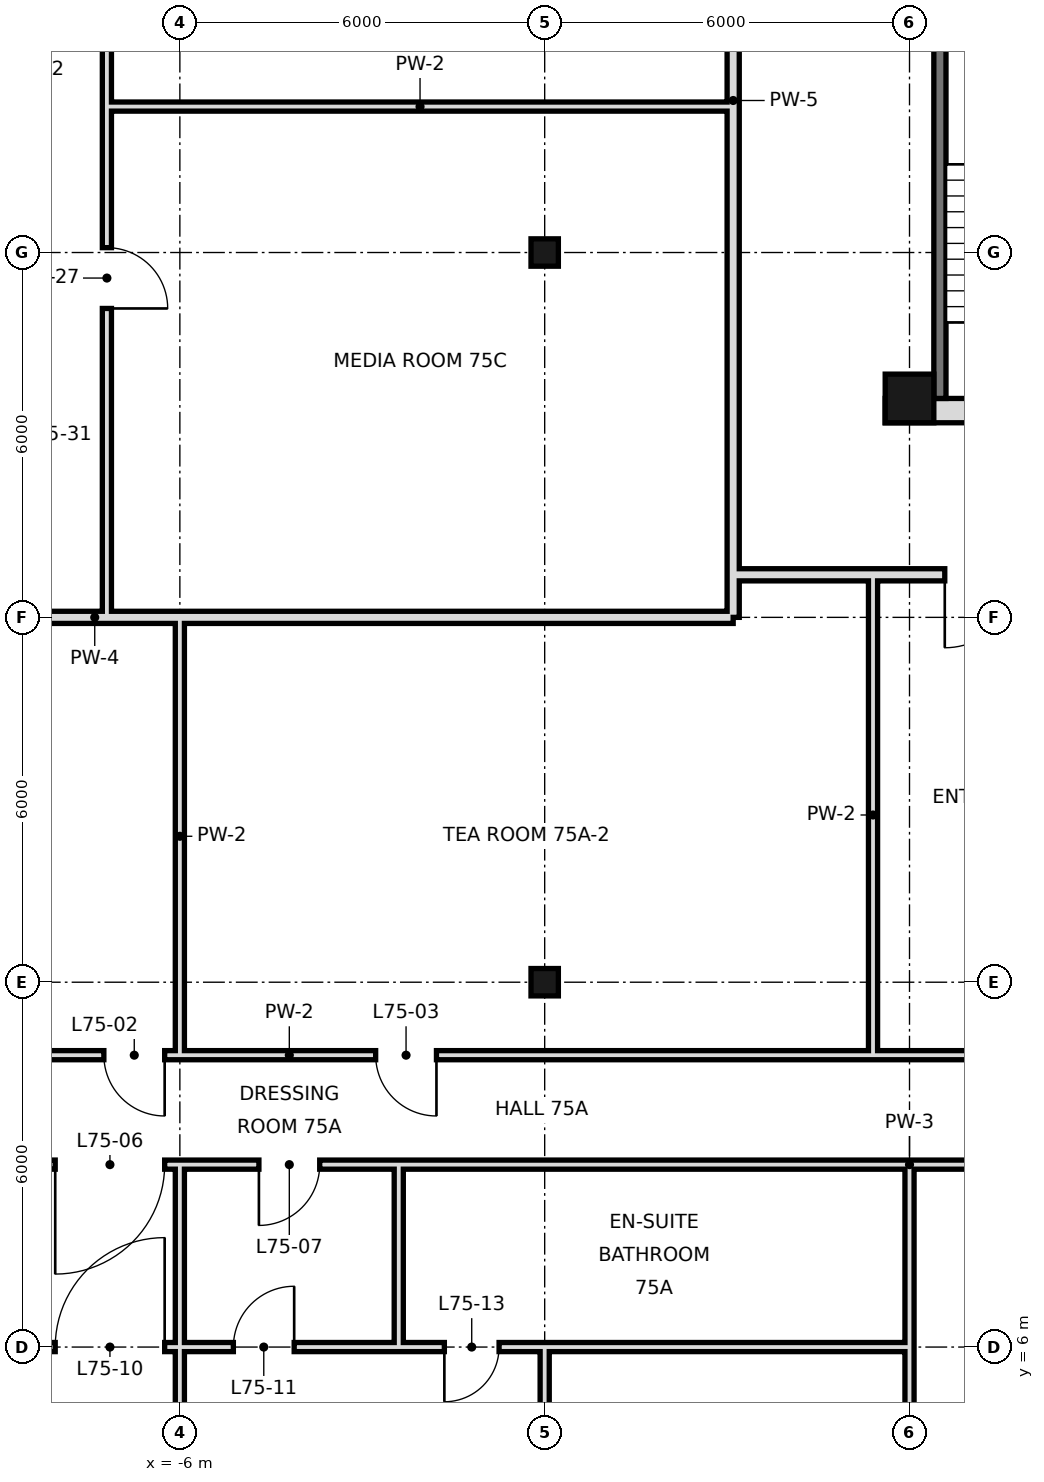
"""IFC4 building model, lengths in metres.
Left out: names, types, materials, properties, quantities, classifications, styles, units other than length and angle.
Written with IfcOpenShell. Run it as: python <this file> out.ifc"""

import sys

from ifc_helpers import new_model, si_unit, direction, frame, frame_2d, origin, origin_2d, place, context, subcontext, project, spatial, rectangle, hollow_rectangle, extrude, element, fill, save


model = new_model("IFC4")
c1 = context("Model", 3, precision=1e-05, world=origin(), true_north=direction((0.0, 1.0)))
c2 = subcontext(c1, "Body", "Model", "MODEL_VIEW")
j1 = project(units=[si_unit("LENGTHUNIT", "METRE"), si_unit("PLANEANGLEUNIT", "RADIAN")], contexts=[c1])
p1 = place(None, origin())
s1 = spatial("IfcSite", under=j1, at=p1, CompositionType="ELEMENT")
p2 = place(p1, origin())
s2 = spatial("IfcBuilding", under=s1, at=p2, CompositionType="ELEMENT")
p3 = place(p2, frame((0.0, 0.0, 316.0)))
s3 = spatial("IfcBuildingStorey", under=s2, at=p3, CompositionType="ELEMENT", Elevation=316.0)
for number, where, z_axis, x_axis in (
    (1, (0.0, 12.0, 0.0), (0.0, 0.0, 1.0), (1.0, 0.0, 0.0)),
    (2, (0.0, 24.0, 0.0), (0.0, 0.0, 1.0), (1.0, 0.0, 0.0)),
):
    element("IfcColumn", number, at=place(p3, frame(where, z_axis=z_axis, x_axis=x_axis)), inside=s3, PredefinedType="COLUMN", context=c2, shape_type="SweptSolid", body=[
        extrude(hollow_rectangle(XDim=0.45, YDim=0.45, WallThickness=0.022, at=origin_2d()), origin(), (0.0, 0.0, 1.0), 3.6),
    ])
p4 = place(p3, frame((6.0, 21.6, 0.0), z_axis=(0.0, 0.0, 1.0), x_axis=(1.0, 0.0, 0.0)))
e3 = element("IfcColumn", 3, at=p4, inside=s3, PredefinedType="COLUMN", context=c2, shape_type="SweptSolid", body=[
    extrude(hollow_rectangle(XDim=0.8, YDim=0.8, WallThickness=0.025, at=origin_2d()), origin(), (0.0, 0.0, 1.0), 3.6),
])
p5 = place(p3, frame((-2.4, 6.0, 0.0), z_axis=(0.0, 0.0, 1.0), x_axis=(0.0, 1.0, 0.0)))
e4 = element("IfcWall", 4, at=p5, inside=s3, PredefinedType="PARTITIONING", context=c2, shape_type="SweptSolid", body=[
    extrude(rectangle(XDim=3.0, YDim=0.15, at=frame_2d((1.5, 0.0))), origin(), (0.0, 0.0, 1.0), 3.42),
])
p6 = place(p3, frame((-6.0, -0.6, 0.0), z_axis=(0.0, 0.0, 1.0), x_axis=(0.0, 1.0, 0.0)))
e5 = element("IfcWall", 5, at=p6, inside=s3, PredefinedType="PARTITIONING", context=c2, shape_type="SweptSolid", body=[
    extrude(rectangle(XDim=9.6, YDim=0.15, at=frame_2d((4.8, 0.0))), origin(), (0.0, 0.0, 1.0), 3.42),
])
p7 = place(p3, frame((-6.0, 10.8, 0.0), z_axis=(0.0, 0.0, 1.0), x_axis=(0.0, 1.0, 0.0)))
e6 = element("IfcWall", 6, at=p7, inside=s3, PredefinedType="PARTITIONING", context=c2, shape_type="SweptSolid", body=[
    extrude(rectangle(XDim=7.2, YDim=0.15, at=frame_2d((3.6, 0.0))), origin(), (0.0, 0.0, 1.0), 3.42),
])
p8 = place(p3, frame((-7.2, 18.0, 0.0), z_axis=(0.0, 0.0, 1.0), x_axis=(0.0, 1.0, 0.0)))
e7 = element("IfcWall", 7, at=p8, inside=s3, PredefinedType="PARTITIONING", context=c2, shape_type="SweptSolid", body=[
    extrude(rectangle(XDim=23.4, YDim=0.15, at=frame_2d((11.7, 0.0))), origin(), (0.0, 0.0, 1.0), 3.42),
])
p9 = place(p8, frame((9.7, 0.0, 0.0)))
e8 = element("IfcOpeningElement", 8, at=p9, cuts=e7, PredefinedType="OPENING", context=c2, shape_type="SweptSolid", body=[
    extrude(rectangle(XDim=1.0, YDim=2.4, at=frame_2d((0.5, 1.2))), frame((0.0, 0.085, 0.0), z_axis=(0.0, -1.0, 0.0), x_axis=(1.0, 0.0, 0.0)), (0.0, 0.0, 1.0), 0.17),
])
p10 = place(p8, frame((5.08, 0.0, 0.0)))
e9 = element("IfcOpeningElement", 9, at=p10, cuts=e7, PredefinedType="OPENING", context=c2, shape_type="SweptSolid", body=[
    extrude(rectangle(XDim=1.0, YDim=2.4, at=frame_2d((0.5, 1.2))), frame((0.0, 0.085, 0.0), z_axis=(0.0, -1.0, 0.0), x_axis=(1.0, 0.0, 0.0)), (0.0, 0.0, 1.0), 0.17),
])
p11 = place(p8, frame((15.22, 0.0, 0.0)))
e10 = element("IfcOpeningElement", 10, at=p11, cuts=e7, PredefinedType="OPENING", context=c2, shape_type="SweptSolid", body=[
    extrude(rectangle(XDim=1.0, YDim=2.4, at=frame_2d((0.5, 1.2))), frame((0.0, 0.085, 0.0), z_axis=(0.0, -1.0, 0.0), x_axis=(1.0, 0.0, 0.0)), (0.0, 0.0, 1.0), 0.17),
])
p12 = place(p3, frame((0.0, 0.0, 0.0), z_axis=(0.0, 0.0, 1.0), x_axis=(0.0, 1.0, 0.0)))
e11 = element("IfcWall", 11, at=p12, inside=s3, PredefinedType="PARTITIONING", context=c2, shape_type="SweptSolid", body=[
    extrude(rectangle(XDim=6.0, YDim=0.15, at=frame_2d((3.0, 0.0))), origin(), (0.0, 0.0, 1.0), 2.72),
])
p13 = place(p12, frame((3.4, 0.0, 0.0)))
e12 = element("IfcOpeningElement", 12, at=p13, cuts=e11, PredefinedType="OPENING", context=c2, shape_type="SweptSolid", body=[
    extrude(rectangle(XDim=1.0, YDim=2.4, at=frame_2d((0.5, 1.2))), frame((0.0, 0.085, 0.0), z_axis=(0.0, -1.0, 0.0), x_axis=(1.0, 0.0, 0.0)), (0.0, 0.0, 1.0), 0.17),
])
p14 = place(p3, frame((3.1, 18.7, 0.0), z_axis=(0.0, 0.0, 1.0), x_axis=(0.0, 1.0, 0.0)))
e13 = element("IfcWall", 13, at=p14, inside=s3, PredefinedType="SOLIDWALL", context=c2, shape_type="SweptSolid", body=[
    extrude(rectangle(XDim=22.7, YDim=0.2, at=frame_2d((11.35, 0.0))), origin(), (0.0, 0.0, 1.0), 2.97),
])
p15 = place(p14, frame((8.9, 0.0, 0.0)))
e14 = element("IfcOpeningElement", 14, at=p15, cuts=e13, PredefinedType="OPENING", context=c2, shape_type="SweptSolid", body=[
    extrude(rectangle(XDim=1.2, YDim=2.4, at=frame_2d((0.6, 1.2))), frame((0.0, 0.11, 0.0), z_axis=(0.0, -1.0, 0.0), x_axis=(1.0, 0.0, 0.0)), (0.0, 0.0, 1.0), 0.22),
])
p16 = place(p3, frame((3.1, 18.0, 0.0), z_axis=(0.0, 0.0, 1.0), x_axis=(0.0, 1.0, 0.0)))
e15 = element("IfcWall", 15, at=p16, inside=s3, PredefinedType="SOLIDWALL", context=c2, shape_type="SweptSolid", body=[
    extrude(rectangle(XDim=0.7, YDim=0.2, at=frame_2d((0.35, 0.0))), origin(), (0.0, 0.0, 1.0), 2.97),
])
p17 = place(p3, frame((5.4, 10.8, 0.0), z_axis=(0.0, 0.0, 1.0), x_axis=(0.0, 1.0, 0.0)))
e16 = element("IfcWall", 16, at=p17, inside=s3, PredefinedType="PARTITIONING", context=c2, shape_type="SweptSolid", body=[
    extrude(rectangle(XDim=7.9, YDim=0.15, at=frame_2d((3.95, 0.0))), origin(), (0.0, 0.0, 1.0), 3.42),
])
p18 = place(p3, frame((6.0, -0.6, 0.0), z_axis=(0.0, 0.0, 1.0), x_axis=(0.0, 1.0, 0.0)))
e17 = element("IfcWall", 17, at=p18, inside=s3, PredefinedType="PARTITIONING", context=c2, shape_type="SweptSolid", body=[
    extrude(rectangle(XDim=6.6, YDim=0.15, at=frame_2d((3.3, 0.0))), origin(), (0.0, 0.0, 1.0), 3.42),
])
p19 = place(p3, frame((6.0, 6.0, 0.0), z_axis=(0.0, 0.0, 1.0), x_axis=(0.0, 1.0, 0.0)))
e18 = element("IfcWall", 18, at=p19, inside=s3, PredefinedType="PARTITIONING", context=c2, shape_type="SweptSolid", body=[
    extrude(rectangle(XDim=3.0, YDim=0.15, at=frame_2d((1.5, 0.0))), origin(), (0.0, 0.0, 1.0), 3.42),
])
p20 = place(p3, frame((-18.6, 10.8, 0.0), z_axis=(0.0, 0.0, 1.0), x_axis=(1.0, 0.0, 0.0)))
e19 = element("IfcWall", 19, at=p20, inside=s3, PredefinedType="PARTITIONING", context=c2, shape_type="SweptSolid", body=[
    extrude(rectangle(XDim=28.8, YDim=0.15, at=frame_2d((14.4, 0.0))), origin(), (0.0, 0.0, 1.0), 3.42),
])
p21 = place(p20, frame((25.9, 0.0, 0.0)))
e20 = element("IfcOpeningElement", 20, at=p21, cuts=e19, PredefinedType="OPENING", context=c2, shape_type="SweptSolid", body=[
    extrude(rectangle(XDim=1.0, YDim=2.4, at=frame_2d((0.5, 1.2))), frame((0.0, 0.085, 0.0), z_axis=(0.0, -1.0, 0.0), x_axis=(1.0, 0.0, 0.0)), (0.0, 0.0, 1.0), 0.17),
])
p22 = place(p20, frame((11.35, 0.0, 0.0)))
e21 = element("IfcOpeningElement", 21, at=p22, cuts=e19, PredefinedType="OPENING", context=c2, shape_type="SweptSolid", body=[
    extrude(rectangle(XDim=1.0, YDim=2.4, at=frame_2d((0.5, 1.2))), frame((0.0, 0.085, 0.0), z_axis=(0.0, -1.0, 0.0), x_axis=(1.0, 0.0, 0.0)), (0.0, 0.0, 1.0), 0.17),
])
p23 = place(p20, frame((15.82, 0.0, 0.0)))
e22 = element("IfcOpeningElement", 22, at=p23, cuts=e19, PredefinedType="OPENING", context=c2, shape_type="SweptSolid", body=[
    extrude(rectangle(XDim=1.0, YDim=2.4, at=frame_2d((0.5, 1.2))), frame((0.0, 0.085, 0.0), z_axis=(0.0, -1.0, 0.0), x_axis=(1.0, 0.0, 0.0)), (0.0, 0.0, 1.0), 0.17),
])
p24 = place(p3, frame((-18.6, 18.0, 0.0), z_axis=(0.0, 0.0, 1.0), x_axis=(1.0, 0.0, 0.0)))
e23 = element("IfcWall", 23, at=p24, inside=s3, PredefinedType="SOLIDWALL", context=c2, shape_type="SweptSolid", body=[
    extrude(rectangle(XDim=21.7, YDim=0.2, at=frame_2d((10.85, 0.0))), origin(), (0.0, 0.0, 1.0), 2.72),
])
p25 = place(p3, frame((3.1, 18.7, 0.0), z_axis=(0.0, 0.0, 1.0), x_axis=(1.0, 0.0, 0.0)))
e24 = element("IfcWall", 24, at=p25, inside=s3, PredefinedType="SOLIDWALL", context=c2, shape_type="SweptSolid", body=[
    extrude(rectangle(XDim=7.1, YDim=0.2, at=frame_2d((3.55, 0.0))), origin(), (0.0, 0.0, 1.0), 2.72),
])
p26 = place(p25, frame((3.48, 0.0, 0.0)))
e25 = element("IfcOpeningElement", 25, at=p26, cuts=e24, PredefinedType="OPENING", context=c2, shape_type="SweptSolid", body=[
    extrude(rectangle(XDim=1.2, YDim=2.4, at=frame_2d((0.6, 1.2))), frame((0.0, 0.11, 0.0), z_axis=(0.0, -1.0, 0.0), x_axis=(1.0, 0.0, 0.0)), (0.0, 0.0, 1.0), 0.22),
])
p27 = place(p3, frame((-7.2, 26.4, 0.0), z_axis=(0.0, 0.0, 1.0), x_axis=(1.0, 0.0, 0.0)))
e26 = element("IfcWall", 26, at=p27, inside=s3, PredefinedType="PARTITIONING", context=c2, shape_type="SweptSolid", body=[
    extrude(rectangle(XDim=10.3, YDim=0.15, at=frame_2d((5.15, 0.0))), origin(), (0.0, 0.0, 1.0), 3.42),
])
p28 = place(p3, frame((-18.0, 6.0, 0.0), z_axis=(0.0, 0.0, 1.0), x_axis=(1.0, 0.0, 0.0)))
e27 = element("IfcWall", 27, at=p28, inside=s3, PredefinedType="PARTITIONING", context=c2, shape_type="SweptSolid", body=[
    extrude(rectangle(XDim=15.6, YDim=0.15, at=frame_2d((7.8, 0.0))), origin(), (0.0, 0.0, 1.0), 2.72),
])
p29 = place(p28, frame((9.95, 0.0, 0.0)))
e28 = element("IfcOpeningElement", 28, at=p29, cuts=e27, PredefinedType="OPENING", context=c2, shape_type="SweptSolid", body=[
    extrude(rectangle(XDim=1.8, YDim=2.4, at=frame_2d((0.9, 1.2))), frame((0.0, 0.085, 0.0), z_axis=(0.0, -1.0, 0.0), x_axis=(1.0, 0.0, 0.0)), (0.0, 0.0, 1.0), 0.17),
])
p30 = place(p28, frame((12.88, 0.0, 0.0)))
e29 = element("IfcOpeningElement", 29, at=p30, cuts=e27, PredefinedType="OPENING", context=c2, shape_type="SweptSolid", body=[
    extrude(rectangle(XDim=1.0, YDim=2.4, at=frame_2d((0.5, 1.2))), frame((0.0, 0.085, 0.0), z_axis=(0.0, -1.0, 0.0), x_axis=(1.0, 0.0, 0.0)), (0.0, 0.0, 1.0), 0.17),
])
p31 = place(p3, frame((-2.4, 6.0, 0.0), z_axis=(0.0, 0.0, 1.0), x_axis=(1.0, 0.0, 0.0)))
e30 = element("IfcWall", 30, at=p31, inside=s3, PredefinedType="PARTITIONING", context=c2, shape_type="SweptSolid", body=[
    extrude(rectangle(XDim=8.4, YDim=0.15, at=frame_2d((4.2, 0.0))), origin(), (0.0, 0.0, 1.0), 2.72),
])
p32 = place(p31, frame((0.75, 0.0, 0.0)))
e31 = element("IfcOpeningElement", 31, at=p32, cuts=e30, PredefinedType="OPENING", context=c2, shape_type="SweptSolid", body=[
    extrude(rectangle(XDim=0.9, YDim=2.4, at=frame_2d((0.45, 1.2))), frame((0.0, 0.085, 0.0), z_axis=(0.0, -1.0, 0.0), x_axis=(1.0, 0.0, 0.0)), (0.0, 0.0, 1.0), 0.17),
])
p33 = place(p3, frame((-18.6, 9.0, 0.0), z_axis=(0.0, 0.0, 1.0), x_axis=(1.0, 0.0, 0.0)))
e32 = element("IfcWall", 32, at=p33, inside=s3, PredefinedType="PARTITIONING", context=c2, shape_type="SweptSolid", body=[
    extrude(rectangle(XDim=16.2, YDim=0.15, at=frame_2d((8.1, 0.0))), origin(), (0.0, 0.0, 1.0), 3.42),
])
p34 = place(p33, frame((10.55, 0.0, 0.0)))
e33 = element("IfcOpeningElement", 33, at=p34, cuts=e32, PredefinedType="OPENING", context=c2, shape_type="SweptSolid", body=[
    extrude(rectangle(XDim=1.8, YDim=2.4, at=frame_2d((0.9, 1.2))), frame((0.0, 0.085, 0.0), z_axis=(0.0, -1.0, 0.0), x_axis=(1.0, 0.0, 0.0)), (0.0, 0.0, 1.0), 0.17),
])
p35 = place(p33, frame((13.9, 0.0, 0.0)))
e34 = element("IfcOpeningElement", 34, at=p35, cuts=e32, PredefinedType="OPENING", context=c2, shape_type="SweptSolid", body=[
    extrude(rectangle(XDim=1.0, YDim=2.4, at=frame_2d((0.5, 1.2))), frame((0.0, 0.085, 0.0), z_axis=(0.0, -1.0, 0.0), x_axis=(1.0, 0.0, 0.0)), (0.0, 0.0, 1.0), 0.17),
])
p36 = place(p3, frame((6.0, 9.0, 0.0), z_axis=(0.0, 0.0, 1.0), x_axis=(1.0, 0.0, 0.0)))
e35 = element("IfcWall", 35, at=p36, inside=s3, PredefinedType="PARTITIONING", context=c2, shape_type="SweptSolid", body=[
    extrude(rectangle(XDim=30.0, YDim=0.15, at=frame_2d((15.0, 0.0))), origin(), (0.0, 0.0, 1.0), 3.42),
])
p37 = place(p36, frame((2.5, 0.0, 0.0)))
e36 = element("IfcOpeningElement", 36, at=p37, cuts=e35, PredefinedType="OPENING", context=c2, shape_type="SweptSolid", body=[
    extrude(rectangle(XDim=1.0, YDim=2.4, at=frame_2d((0.5, 1.2))), frame((0.0, 0.085, 0.0), z_axis=(0.0, -1.0, 0.0), x_axis=(1.0, 0.0, 0.0)), (0.0, 0.0, 1.0), 0.17),
])
p38 = place(p36, frame((7.6, 0.0, 0.0)))
e37 = element("IfcOpeningElement", 37, at=p38, cuts=e35, PredefinedType="OPENING", context=c2, shape_type="SweptSolid", body=[
    extrude(rectangle(XDim=1.0, YDim=2.4, at=frame_2d((0.5, 1.2))), frame((0.0, 0.085, 0.0), z_axis=(0.0, -1.0, 0.0), x_axis=(1.0, 0.0, 0.0)), (0.0, 0.0, 1.0), 0.17),
])
p39 = place(p36, frame((15.4, 0.0, 0.0)))
e38 = element("IfcOpeningElement", 38, at=p39, cuts=e35, PredefinedType="OPENING", context=c2, shape_type="SweptSolid", body=[
    extrude(rectangle(XDim=1.0, YDim=2.4, at=frame_2d((0.5, 1.2))), frame((0.0, 0.085, 0.0), z_axis=(0.0, -1.0, 0.0), x_axis=(1.0, 0.0, 0.0)), (0.0, 0.0, 1.0), 0.17),
])
p40 = place(p36, frame((25.04, 0.0, 0.0)))
e39 = element("IfcOpeningElement", 39, at=p40, cuts=e35, PredefinedType="OPENING", context=c2, shape_type="SweptSolid", body=[
    extrude(rectangle(XDim=1.8, YDim=2.4, at=frame_2d((0.9, 1.2))), frame((0.0, 0.085, 0.0), z_axis=(0.0, -1.0, 0.0), x_axis=(1.0, 0.0, 0.0)), (0.0, 0.0, 1.0), 0.17),
])
p41 = place(p3, frame((-2.4, 9.0, 0.0), z_axis=(0.0, 0.0, 1.0), x_axis=(1.0, 0.0, 0.0)))
e40 = element("IfcWall", 40, at=p41, inside=s3, PredefinedType="PARTITIONING", context=c2, shape_type="SweptSolid", body=[
    extrude(rectangle(XDim=8.4, YDim=0.15, at=frame_2d((4.2, 0.0))), origin(), (0.0, 0.0, 1.0), 3.42),
])
p42 = place(p3, frame((6.5, 21.6, 0.0), z_axis=(0.0, 0.0, 1.0), x_axis=(0.0, 1.0, 0.0)))
e41 = element("IfcWall", 41, at=p42, inside=s3, PredefinedType="SOLIDWALL", context=c2, shape_type="SweptSolid", body=[
    extrude(rectangle(XDim=23.5, YDim=0.2, at=frame_2d((11.75, 0.0))), origin(), (0.0, 0.0, 1.0), 3.42),
])
p43 = place(p3, frame((5.6, 21.4, 0.0), z_axis=(0.0, 0.0, 1.0), x_axis=(1.0, 0.0, 0.0)))
e42 = element("IfcWall", 42, at=p43, inside=s3, PredefinedType="SOLIDWALL", context=c2, shape_type="SweptSolid", body=[
    extrude(rectangle(XDim=36.8, YDim=0.4, at=frame_2d((18.4, 0.0))), origin(), (0.0, 0.0, 1.0), 3.42),
])
p44 = place(p43, frame((8.5, 0.0, 0.0)))
e43 = element("IfcOpeningElement", 43, at=p44, cuts=e42, PredefinedType="OPENING", context=c2, shape_type="SweptSolid", body=[
    extrude(rectangle(XDim=1.8, YDim=2.1, at=frame_2d((0.9, 1.05))), frame((0.0, 0.21, 0.0), z_axis=(0.0, -1.0, 0.0), x_axis=(1.0, 0.0, 0.0)), (0.0, 0.0, 1.0), 0.42),
])
p45 = place(p43, frame((17.5, 0.0, 0.0)))
e44 = element("IfcOpeningElement", 44, at=p45, cuts=e42, PredefinedType="OPENING", context=c2, shape_type="SweptSolid", body=[
    extrude(rectangle(XDim=1.8, YDim=2.1, at=frame_2d((0.9, 1.05))), frame((0.0, 0.21, 0.0), z_axis=(0.0, -1.0, 0.0), x_axis=(1.0, 0.0, 0.0)), (0.0, 0.0, 1.0), 0.42),
])
p46 = place(p43, frame((26.5, 0.0, 0.0)))
e45 = element("IfcOpeningElement", 45, at=p46, cuts=e42, PredefinedType="OPENING", context=c2, shape_type="SweptSolid", body=[
    extrude(rectangle(XDim=1.8, YDim=2.1, at=frame_2d((0.9, 1.05))), frame((0.0, 0.21, 0.0), z_axis=(0.0, -1.0, 0.0), x_axis=(1.0, 0.0, 0.0)), (0.0, 0.0, 1.0), 0.42),
])
p47 = place(p43, frame((4.5, 0.0, 0.0)))
e46 = element("IfcOpeningElement", 46, at=p47, cuts=e42, PredefinedType="OPENING", context=c2, shape_type="SweptSolid", body=[
    extrude(rectangle(XDim=1.2, YDim=2.1, at=frame_2d((0.6, 1.05))), frame((0.0, 0.21, 0.0), z_axis=(0.0, -1.0, 0.0), x_axis=(1.0, 0.0, 0.0)), (0.0, 0.0, 1.0), 0.42),
])
p48 = place(p43, frame((31.1, 0.0, 0.0)))
e47 = element("IfcOpeningElement", 47, at=p48, cuts=e42, PredefinedType="OPENING", context=c2, shape_type="SweptSolid", body=[
    extrude(rectangle(XDim=1.2, YDim=2.1, at=frame_2d((0.6, 1.05))), frame((0.0, 0.21, 0.0), z_axis=(0.0, -1.0, 0.0), x_axis=(1.0, 0.0, 0.0)), (0.0, 0.0, 1.0), 0.42),
])
p49 = place(p22, origin())
e48 = element("IfcDoor", 48, at=p49, inside=s3, OperationType="SINGLE_SWING_RIGHT", PredefinedType="DOOR", context=c2, shape_type="SweptSolid", body=[
    extrude(rectangle(XDim=1.0, YDim=2.4, at=frame_2d((0.5, 1.2))), frame((0.0, 0.025, 0.0), z_axis=(0.0, -1.0, 0.0), x_axis=(1.0, 0.0, 0.0)), (0.0, 0.0, 1.0), 0.05),
])
fill(e21, e48)
p50 = place(p23, origin())
e49 = element("IfcDoor", 49, at=p50, inside=s3, OperationType="SINGLE_SWING_RIGHT", PredefinedType="DOOR", context=c2, shape_type="SweptSolid", body=[
    extrude(rectangle(XDim=1.0, YDim=2.4, at=frame_2d((0.5, 1.2))), frame((0.0, 0.025, 0.0), z_axis=(0.0, -1.0, 0.0), x_axis=(1.0, 0.0, 0.0)), (0.0, 0.0, 1.0), 0.05),
])
fill(e22, e49)
p51 = place(p34, frame((1.8, 0.0, 0.0), z_axis=(0.0, 0.0, 1.0), x_axis=(-1.0, 0.0, 0.0)))
e50 = element("IfcDoor", 50, at=p51, inside=s3, OperationType="SINGLE_SWING_RIGHT", PredefinedType="DOOR", context=c2, shape_type="SweptSolid", body=[
    extrude(rectangle(XDim=1.8, YDim=2.4, at=frame_2d((0.9, 1.2))), frame((0.0, 0.025, 0.0), z_axis=(0.0, -1.0, 0.0), x_axis=(1.0, 0.0, 0.0)), (0.0, 0.0, 1.0), 0.05),
])
fill(e33, e50)
p52 = place(p35, frame((1.0, 0.0, 0.0), z_axis=(0.0, 0.0, 1.0), x_axis=(-1.0, 0.0, 0.0)))
e51 = element("IfcDoor", 51, at=p52, inside=s3, OperationType="SINGLE_SWING_RIGHT", PredefinedType="DOOR", context=c2, shape_type="SweptSolid", body=[
    extrude(rectangle(XDim=1.0, YDim=2.4, at=frame_2d((0.5, 1.2))), frame((0.0, 0.025, 0.0), z_axis=(0.0, -1.0, 0.0), x_axis=(1.0, 0.0, 0.0)), (0.0, 0.0, 1.0), 0.05),
])
fill(e34, e51)
p53 = place(p29, frame((1.8, 0.0, 0.0), z_axis=(0.0, 0.0, 1.0), x_axis=(-1.0, 0.0, 0.0)))
e52 = element("IfcDoor", 52, at=p53, inside=s3, OperationType="SINGLE_SWING_LEFT", PredefinedType="DOOR", context=c2, shape_type="SweptSolid", body=[
    extrude(rectangle(XDim=1.8, YDim=2.4, at=frame_2d((0.9, 1.2))), frame((0.0, 0.025, 0.0), z_axis=(0.0, -1.0, 0.0), x_axis=(1.0, 0.0, 0.0)), (0.0, 0.0, 1.0), 0.05),
])
fill(e28, e52)
p54 = place(p30, frame((1.0, 0.0, 0.0), z_axis=(0.0, 0.0, 1.0), x_axis=(-1.0, 0.0, 0.0)))
e53 = element("IfcDoor", 53, at=p54, inside=s3, OperationType="SINGLE_SWING_LEFT", PredefinedType="DOOR", context=c2, shape_type="SweptSolid", body=[
    extrude(rectangle(XDim=1.0, YDim=2.4, at=frame_2d((0.5, 1.2))), frame((0.0, 0.025, 0.0), z_axis=(0.0, -1.0, 0.0), x_axis=(1.0, 0.0, 0.0)), (0.0, 0.0, 1.0), 0.05),
])
fill(e29, e53)
p55 = place(p32, frame((0.9, 0.0, 0.0), z_axis=(0.0, 0.0, 1.0), x_axis=(-1.0, 0.0, 0.0)))
e54 = element("IfcDoor", 54, at=p55, inside=s3, OperationType="SINGLE_SWING_RIGHT", PredefinedType="DOOR", context=c2, shape_type="SweptSolid", body=[
    extrude(rectangle(XDim=0.9, YDim=2.4, at=frame_2d((0.45, 1.2))), frame((0.0, 0.025, 0.0), z_axis=(0.0, -1.0, 0.0), x_axis=(1.0, 0.0, 0.0)), (0.0, 0.0, 1.0), 0.05),
])
fill(e31, e54)
p56 = place(p10, frame((1.0, 0.0, 0.0), z_axis=(0.0, 0.0, 1.0), x_axis=(-1.0, 0.0, 0.0)))
e55 = element("IfcDoor", 55, at=p56, inside=s3, OperationType="SINGLE_SWING_RIGHT", PredefinedType="DOOR", context=c2, shape_type="SweptSolid", body=[
    extrude(rectangle(XDim=1.0, YDim=2.4, at=frame_2d((0.5, 1.2))), frame((0.0, 0.025, 0.0), z_axis=(0.0, -1.0, 0.0), x_axis=(1.0, 0.0, 0.0)), (0.0, 0.0, 1.0), 0.05),
])
fill(e9, e55)
p57 = place(p26, frame((1.2, 0.0, 0.0), z_axis=(0.0, 0.0, 1.0), x_axis=(-1.0, 0.0, 0.0)))
e56 = element("IfcDoor", 56, at=p57, inside=s3, OperationType="SINGLE_SWING_RIGHT", PredefinedType="DOOR", context=c2, shape_type="SweptSolid", body=[
    extrude(rectangle(XDim=1.2, YDim=2.4, at=frame_2d((0.6, 1.2))), frame((0.0, 0.025, 0.0), z_axis=(0.0, -1.0, 0.0), x_axis=(1.0, 0.0, 0.0)), (0.0, 0.0, 1.0), 0.05),
])
fill(e25, e56)
save(model, sys.argv[1])
